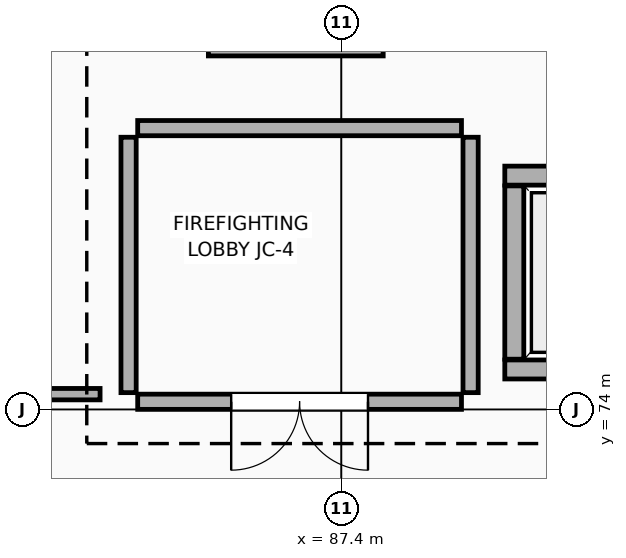
"""IFC4 building model, lengths in metres.
Left out: names, types, materials, properties, quantities, classifications, styles, units other than length and angle.
Written with IfcOpenShell. Run it as: python <this file> out.ifc"""

import sys

from ifc_helpers import new_model, si_unit, direction, frame, frame_2d, origin, place, context, subcontext, project, spatial, rectangle, extrude, element, fill, save


model = new_model("IFC4")
c1 = context("Model", 3, precision=1e-05, world=origin(), true_north=direction((0.0, 1.0)))
c2 = subcontext(c1, "Body", "Model", "MODEL_VIEW")
j1 = project(units=[si_unit("LENGTHUNIT", "METRE"), si_unit("PLANEANGLEUNIT", "RADIAN")], contexts=[c1])
p1 = place(None, origin())
s1 = spatial("IfcSite", under=j1, at=p1, CompositionType="ELEMENT")
p2 = place(p1, origin())
s2 = spatial("IfcBuilding", under=s1, at=p2, CompositionType="ELEMENT")
p3 = place(p2, frame((0.0, 0.0, 10.2)))
s3 = spatial("IfcBuildingStorey", under=s2, at=p3, CompositionType="ELEMENT", Elevation=10.2)
p4 = place(p3, frame((89.55, 74.525, 0.0), z_axis=(0.0, 0.0, 1.0), x_axis=(1.0, 0.0, 0.0)))
e1 = element("IfcWall", 1, at=p4, inside=s3, PredefinedType="STANDARD", context=c2, shape_type="SweptSolid", body=[
    extrude(rectangle(XDim=2.5, YDim=0.25, at=frame_2d((1.25, 0.0))), origin(), (0.0, 0.0, 1.0), 4.53),
])
p5 = place(p4, frame((0.65, 0.0, 0.0)))
e2 = element("IfcOpeningElement", 2, at=p5, cuts=e1, PredefinedType="OPENING", context=c2, shape_type="SweptSolid", body=[
    extrude(rectangle(XDim=1.2, YDim=2.05, at=frame_2d((0.6, 1.025))), frame((0.0, 0.135, 0.0), z_axis=(0.0, -1.0, 0.0), x_axis=(1.0, 0.0, 0.0)), (0.0, 0.0, 1.0), 0.27),
])
p6 = place(p3, frame((92.05, 77.075, 0.0), z_axis=(0.0, 0.0, 1.0), x_axis=(-1.0, 0.0, 0.0)))
e3 = element("IfcWall", 3, at=p6, inside=s3, PredefinedType="STANDARD", context=c2, shape_type="SweptSolid", body=[
    extrude(rectangle(XDim=2.5, YDim=0.25, at=frame_2d((1.25, 0.0))), origin(), (0.0, 0.0, 1.0), 4.53),
])
p7 = place(p3, frame((89.675, 76.94, 0.0), z_axis=(0.0, 0.0, 1.0), x_axis=(0.0, -1.0, 0.0)))
e4 = element("IfcWall", 4, at=p7, inside=s3, PredefinedType="STANDARD", context=c2, shape_type="SweptSolid", body=[
    extrude(rectangle(XDim=2.28, YDim=0.25, at=frame_2d((1.14, 0.0))), origin(), (0.0, 0.0, 1.0), 4.53),
])
p8 = place(p3, frame((85.65, 78.775, 0.0), z_axis=(0.0, 0.0, 1.0), x_axis=(1.0, 0.0, 0.0)))
e5 = element("IfcWall", 5, at=p8, inside=s3, PredefinedType="STANDARD", context=c2, shape_type="SweptSolid", body=[
    extrude(rectangle(XDim=2.3, YDim=0.25, at=frame_2d((1.15, 0.0))), origin(), (0.0, 0.0, 1.0), 4.53),
])
p9 = place(p3, frame((84.6, 74.22, 0.0), z_axis=(0.0, 0.0, 1.0), x_axis=(0.0, 1.0, 0.0)))
e6 = element("IfcWall", 6, at=p9, inside=s3, PredefinedType="PARTITIONING", context=c2, shape_type="SweptSolid", body=[
    extrude(rectangle(XDim=3.36, YDim=0.2, at=frame_2d((1.68, 0.0))), origin(), (0.0, 0.0, 1.0), 4.53),
])
p10 = place(p3, frame((84.72, 77.7, 0.0), z_axis=(0.0, 0.0, 1.0), x_axis=(1.0, 0.0, 0.0)))
e7 = element("IfcWall", 7, at=p10, inside=s3, PredefinedType="PARTITIONING", context=c2, shape_type="SweptSolid", body=[
    extrude(rectangle(XDim=4.26, YDim=0.2, at=frame_2d((2.13, 0.0))), origin(), (0.0, 0.0, 1.0), 4.53),
])
p11 = place(p3, frame((89.1, 77.58, 0.0), z_axis=(0.0, 0.0, 1.0), x_axis=(0.0, -1.0, 0.0)))
e8 = element("IfcWall", 8, at=p11, inside=s3, PredefinedType="PARTITIONING", context=c2, shape_type="SweptSolid", body=[
    extrude(rectangle(XDim=3.36, YDim=0.2, at=frame_2d((1.68, 0.0))), origin(), (0.0, 0.0, 1.0), 4.53),
])
p12 = place(p3, frame((88.98, 74.1, 0.0), z_axis=(0.0, 0.0, 1.0), x_axis=(-1.0, 0.0, 0.0)))
e9 = element("IfcWall", 9, at=p12, inside=s3, PredefinedType="PARTITIONING", context=c2, shape_type="SweptSolid", body=[
    extrude(rectangle(XDim=4.26, YDim=0.2, at=frame_2d((2.13, 0.0))), origin(), (0.0, 0.0, 1.0), 4.53),
])
p13 = place(p12, frame((1.23, 0.0, 0.0)))
e10 = element("IfcOpeningElement", 10, at=p13, cuts=e9, PredefinedType="OPENING", context=c2, shape_type="SweptSolid", body=[
    extrude(rectangle(XDim=1.8, YDim=2.15, at=frame_2d((0.9, 1.075))), frame((0.0, 0.11, 0.0), z_axis=(0.0, -1.0, 0.0), x_axis=(1.0, 0.0, 0.0)), (0.0, 0.0, 1.0), 0.22),
])
p14 = place(p3, frame((84.225, 74.2, 0.0), z_axis=(0.0, 0.0, 1.0), x_axis=(-1.0, 0.0, 0.0)))
e11 = element("IfcWall", 11, at=p14, inside=s3, PredefinedType="PARTITIONING", context=c2, shape_type="SweptSolid", body=[
    extrude(rectangle(XDim=4.485, YDim=0.15, at=frame_2d((2.243, 0.0))), origin(), (0.0, 0.0, 1.0), 4.53),
])
p15 = place(p13, origin())
e12 = element("IfcDoor", 12, at=p15, inside=s3, OperationType="DOUBLE_DOOR_SINGLE_SWING", PredefinedType="DOOR", context=c2, shape_type="SweptSolid", body=[
    extrude(rectangle(XDim=1.8, YDim=2.15, at=frame_2d((0.9, 1.075))), frame((0.0, 0.025, 0.0), z_axis=(0.0, -1.0, 0.0), x_axis=(1.0, 0.0, 0.0)), (0.0, 0.0, 1.0), 0.05),
])
fill(e10, e12)
save(model, sys.argv[1])
